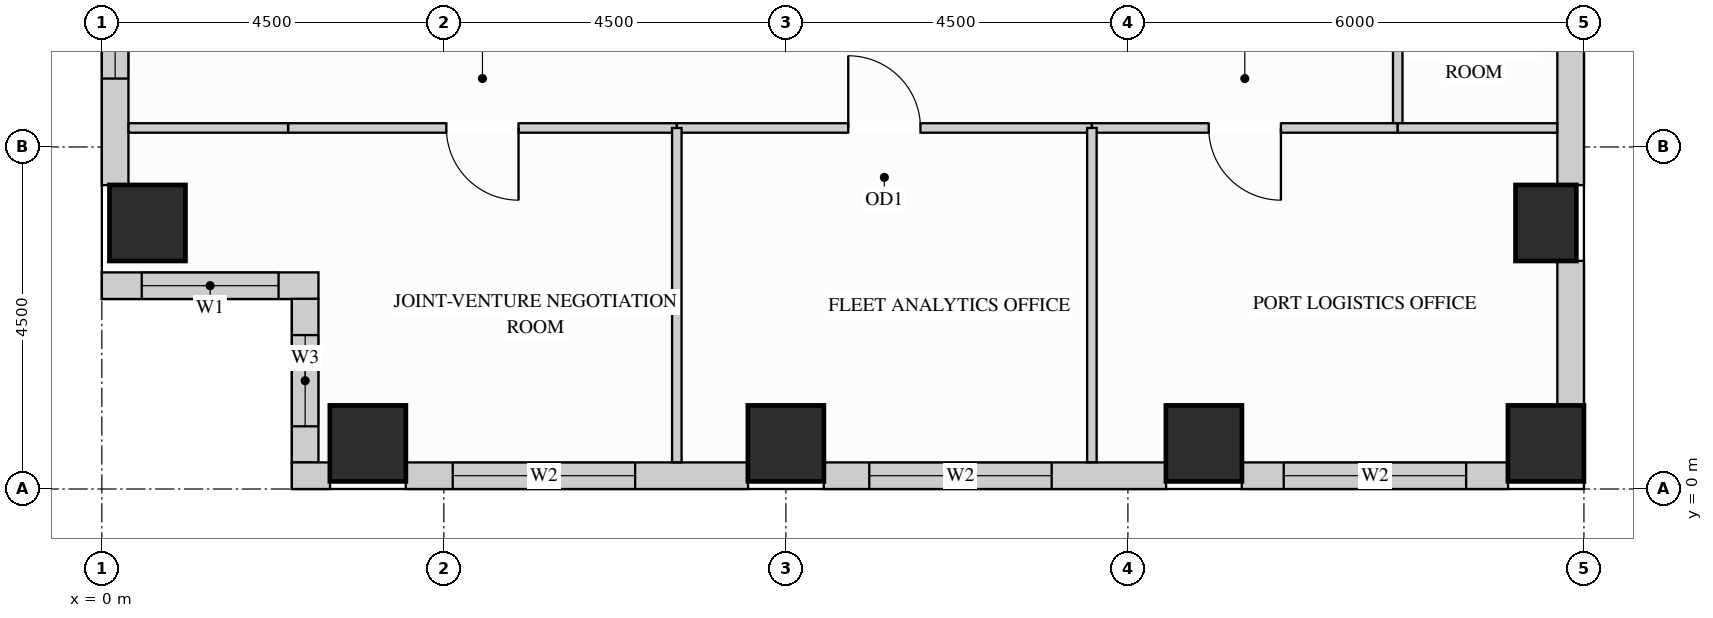
"""IFC4 building model, lengths in metres.
Left out: names, types, materials, properties, quantities, classifications, styles, units other than length and angle.
Written with IfcOpenShell. Run it as: python <this file> out.ifc"""

import sys

from ifc_helpers import new_model, si_unit, direction, frame, frame_2d, origin, origin_2d, place, context, subcontext, project, spatial, rectangle, extrude, source, transform, mapped, element, fill, save


model = new_model("IFC4")
c1 = context("Model", 3, precision=1e-05, world=origin(), true_north=direction((0.0, 1.0)))
c2 = subcontext(c1, "Body", "Model", "MODEL_VIEW")
j1 = project(units=[si_unit("LENGTHUNIT", "METRE"), si_unit("PLANEANGLEUNIT", "RADIAN")], contexts=[c1])
p1 = place(None, origin())
s1 = spatial("IfcSite", under=j1, at=p1, CompositionType="ELEMENT")
p2 = place(p1, origin())
s2 = spatial("IfcBuilding", under=s1, at=p2, CompositionType="ELEMENT")
p3 = place(p2, frame((0.0, 0.0, 164.7)))
s3 = spatial("IfcBuildingStorey", under=s2, at=p3, CompositionType="ELEMENT", Elevation=164.7)
m1 = source(origin(), c2, "Body", "SweptSolid", [
    extrude(rectangle(XDim=0.8, YDim=1.0, at=origin_2d()), origin(), (0.0, 0.0, 1.0), 3.4),
])
p4 = place(p3, frame((19.0, 3.5, 0.0), z_axis=(0.0, 0.0, 1.0), x_axis=(1.0, 0.0, 0.0)))
e1 = element("IfcColumn", 1, at=p4, inside=s3, PredefinedType="COLUMN", context=c2, shape_type="MappedRepresentation", body=[
    mapped(m1, transform((0.0, 0.0, 0.0), x_axis=(1.0, 0.0, 0.0), y_axis=(0.0, 1.0, 0.0), z_axis=(0.0, 0.0, 1.0))),
])
m2 = source(origin(), c2, "Body", "SweptSolid", [
    extrude(rectangle(XDim=1.0, YDim=1.0, at=origin_2d()), origin(), (0.0, 0.0, 1.0), 3.4),
])
for number, where, z_axis, x_axis in (
    (2, (14.5, 0.6, 0.0), (0.0, 0.0, 1.0), (1.0, 0.0, 0.0)),
    (3, (19.0, 0.6, 0.0), (0.0, 0.0, 1.0), (1.0, 0.0, 0.0)),
    (4, (3.5, 0.6, 0.0), (0.0, 0.0, 1.0), (1.0, 0.0, 0.0)),
    (5, (9.0, 0.6, 0.0), (0.0, 0.0, 1.0), (1.0, 0.0, 0.0)),
    (6, (0.6, 3.5, 0.0), (0.0, 0.0, 1.0), (1.0, 0.0, 0.0)),
):
    element("IfcColumn", number, at=place(p3, frame(where, z_axis=z_axis, x_axis=x_axis)), inside=s3, PredefinedType="COLUMN", context=c2, shape_type="MappedRepresentation", body=[
        mapped(m2, transform((0.0, 0.0, 0.0), x_axis=(1.0, 0.0, 0.0), y_axis=(0.0, 1.0, 0.0), z_axis=(0.0, 0.0, 1.0))),
    ])
p5 = place(p3, frame((0.175, 8.002, 0.0), z_axis=(0.0, 0.0, 1.0), x_axis=(0.0, -1.0, 0.0)))
e7 = element("IfcWall", 7, at=p5, inside=s3, PredefinedType="SOLIDWALL", context=c2, shape_type="SweptSolid", body=[
    extrude(rectangle(XDim=4.004, YDim=0.35, at=frame_2d((2.002, 0.0))), origin(), (0.0, 0.0, 1.0), 2.612),
])
p6 = place(p5, frame((0.802, 0.0, 0.78)))
e8 = element("IfcOpeningElement", 8, at=p6, cuts=e7, PredefinedType="OPENING", context=c2, shape_type="SweptSolid", body=[
    extrude(rectangle(XDim=1.8, YDim=1.652, at=frame_2d((0.9, 0.826))), frame((0.0, 0.185, 0.0), z_axis=(0.0, -1.0, 0.0), x_axis=(1.0, 0.0, 0.0)), (0.0, 0.0, 1.0), 0.37),
])
p7 = place(p3, frame((0.0, 2.675, 0.0), z_axis=(0.0, 0.0, 1.0), x_axis=(1.0, 0.0, 0.0)))
e9 = element("IfcWall", 9, at=p7, inside=s3, PredefinedType="SOLIDWALL", context=c2, shape_type="SweptSolid", body=[
    extrude(rectangle(XDim=2.85, YDim=0.35, at=frame_2d((1.425, 0.0))), origin(), (0.0, 0.0, 1.0), 3.385),
])
p8 = place(p7, frame((0.525, 0.0, 0.78)))
e10 = element("IfcOpeningElement", 10, at=p8, cuts=e9, PredefinedType="OPENING", context=c2, shape_type="SweptSolid", body=[
    extrude(rectangle(XDim=1.8, YDim=2.1, at=frame_2d((0.9, 1.05))), frame((0.0, 0.185, 0.0), z_axis=(0.0, -1.0, 0.0), x_axis=(1.0, 0.0, 0.0)), (0.0, 0.0, 1.0), 0.37),
])
p9 = place(p3, frame((2.675, 2.502, 0.0), z_axis=(0.0, 0.0, 1.0), x_axis=(0.0, -1.0, 0.0)))
e11 = element("IfcWall", 11, at=p9, inside=s3, PredefinedType="SOLIDWALL", context=c2, shape_type="SweptSolid", body=[
    extrude(rectangle(XDim=2.154, YDim=0.35, at=frame_2d((1.077, 0.0))), origin(), (0.0, 0.0, 1.0), 3.385),
])
p10 = place(p9, frame((0.477, 0.0, 0.78)))
e12 = element("IfcOpeningElement", 12, at=p10, cuts=e11, PredefinedType="OPENING", context=c2, shape_type="SweptSolid", body=[
    extrude(rectangle(XDim=1.2, YDim=2.1, at=frame_2d((0.6, 1.05))), frame((0.0, 0.185, 0.0), z_axis=(0.0, -1.0, 0.0), x_axis=(1.0, 0.0, 0.0)), (0.0, 0.0, 1.0), 0.37),
])
m3 = source(origin(), c2, "Body", "SweptSolid", [
    extrude(rectangle(XDim=0.502, YDim=0.35, at=frame_2d((0.251, 0.0))), origin(), (0.0, 0.0, 1.0), 3.385),
])
p11 = place(p3, frame((2.5, 0.175, 0.0), z_axis=(0.0, 0.0, 1.0), x_axis=(1.0, 0.0, 0.0)))
e13 = element("IfcWall", 13, at=p11, inside=s3, PredefinedType="SOLIDWALL", context=c2, shape_type="MappedRepresentation", body=[
    mapped(m3, transform((0.0, 0.0, 0.0), x_axis=(1.0, 0.0, 0.0), y_axis=(0.0, 1.0, 0.0), z_axis=(0.0, 0.0, 1.0))),
])
p12 = place(p3, frame((3.998, 0.175, 0.0), z_axis=(0.0, 0.0, 1.0), x_axis=(1.0, 0.0, 0.0)))
e14 = element("IfcWall", 14, at=p12, inside=s3, PredefinedType="SOLIDWALL", context=c2, shape_type="SweptSolid", body=[
    extrude(rectangle(XDim=4.504, YDim=0.35, at=frame_2d((2.252, 0.0))), origin(), (0.0, 0.0, 1.0), 2.612),
])
p13 = place(p12, frame((0.618, 0.0, 0.78)))
e15 = element("IfcOpeningElement", 15, at=p13, cuts=e14, PredefinedType="OPENING", context=c2, shape_type="SweptSolid", body=[
    extrude(rectangle(XDim=2.4, YDim=1.652, at=frame_2d((1.2, 0.826))), frame((0.0, 0.185, 0.0), z_axis=(0.0, -1.0, 0.0), x_axis=(1.0, 0.0, 0.0)), (0.0, 0.0, 1.0), 0.37),
])
p14 = place(p3, frame((9.498, 0.175, 0.0), z_axis=(0.0, 0.0, 1.0), x_axis=(1.0, 0.0, 0.0)))
e16 = element("IfcWall", 16, at=p14, inside=s3, PredefinedType="SOLIDWALL", context=c2, shape_type="SweptSolid", body=[
    extrude(rectangle(XDim=4.504, YDim=0.35, at=frame_2d((2.252, 0.0))), origin(), (0.0, 0.0, 1.0), 2.612),
])
p15 = place(p14, frame((0.599, 0.0, 0.78)))
e17 = element("IfcOpeningElement", 17, at=p15, cuts=e16, PredefinedType="OPENING", context=c2, shape_type="SweptSolid", body=[
    extrude(rectangle(XDim=2.4, YDim=1.652, at=frame_2d((1.2, 0.826))), frame((0.0, 0.185, 0.0), z_axis=(0.0, -1.0, 0.0), x_axis=(1.0, 0.0, 0.0)), (0.0, 0.0, 1.0), 0.37),
])
p16 = place(p3, frame((14.998, 0.175, 0.0), z_axis=(0.0, 0.0, 1.0), x_axis=(1.0, 0.0, 0.0)))
e18 = element("IfcWall", 18, at=p16, inside=s3, PredefinedType="SOLIDWALL", context=c2, shape_type="SweptSolid", body=[
    extrude(rectangle(XDim=3.504, YDim=0.35, at=frame_2d((1.752, 0.0))), origin(), (0.0, 0.0, 1.0), 2.612),
])
p17 = place(p16, frame((0.552, 0.0, 0.78)))
e19 = element("IfcOpeningElement", 19, at=p17, cuts=e18, PredefinedType="OPENING", context=c2, shape_type="SweptSolid", body=[
    extrude(rectangle(XDim=2.4, YDim=1.652, at=frame_2d((1.2, 0.826))), frame((0.0, 0.185, 0.0), z_axis=(0.0, -1.0, 0.0), x_axis=(1.0, 0.0, 0.0)), (0.0, 0.0, 1.0), 0.37),
])
m4 = source(origin(), c2, "Body", "SweptSolid", [
    extrude(rectangle(XDim=1.904, YDim=0.35, at=frame_2d((0.952, 0.0))), origin(), (0.0, 0.0, 1.0), 2.612),
])
p18 = place(p3, frame((19.325, 1.098, 0.0), z_axis=(0.0, 0.0, 1.0), x_axis=(0.0, 1.0, 0.0)))
e20 = element("IfcWall", 20, at=p18, inside=s3, PredefinedType="SOLIDWALL", context=c2, shape_type="MappedRepresentation", body=[
    mapped(m4, transform((0.0, 0.0, 0.0), x_axis=(1.0, 0.0, 0.0), y_axis=(0.0, 1.0, 0.0), z_axis=(0.0, 0.0, 1.0))),
])
m5 = source(origin(), c2, "Body", "SweptSolid", [
    extrude(rectangle(XDim=4.004, YDim=0.35, at=frame_2d((2.002, 0.0))), origin(), (0.0, 0.0, 1.0), 2.612),
])
p19 = place(p3, frame((19.325, 3.998, 0.0), z_axis=(0.0, 0.0, 1.0), x_axis=(0.0, 1.0, 0.0)))
e21 = element("IfcWall", 21, at=p19, inside=s3, PredefinedType="SOLIDWALL", context=c2, shape_type="MappedRepresentation", body=[
    mapped(m5, transform((0.0, 0.0, 0.0), x_axis=(1.0, 0.0, 0.0), y_axis=(0.0, 1.0, 0.0), z_axis=(0.0, 0.0, 1.0))),
])
p20 = place(p3, frame((17.05, 4.75, 0.0), z_axis=(0.0, 0.0, 1.0), x_axis=(0.0, 1.0, 0.0)))
e22 = element("IfcWall", 22, at=p20, inside=s3, PredefinedType="PARTITIONING", context=c2, shape_type="SweptSolid", body=[
    extrude(rectangle(XDim=5.85, YDim=0.125, at=frame_2d((2.925, 0.0))), origin(), (0.0, 0.0, 1.0), 3.385),
])
p21 = place(p20, frame((2.45, 0.0, 0.0)))
e23 = element("IfcOpeningElement", 23, at=p21, cuts=e22, PredefinedType="OPENING", context=c2, shape_type="SweptSolid", body=[
    extrude(rectangle(XDim=0.95, YDim=2.15, at=frame_2d((0.475, 1.075))), frame((0.0, 0.073, 0.0), z_axis=(0.0, -1.0, 0.0), x_axis=(1.0, 0.0, 0.0)), (0.0, 0.0, 1.0), 0.145),
])
p22 = place(p3, frame((2.45, 4.75, 0.0), z_axis=(0.0, 0.0, 1.0), x_axis=(1.0, 0.0, 0.0)))
e24 = element("IfcWall", 24, at=p22, inside=s3, PredefinedType="PARTITIONING", context=c2, shape_type="SweptSolid", body=[
    extrude(rectangle(XDim=5.115, YDim=0.125, at=frame_2d((2.558, 0.0))), origin(), (0.0, 0.0, 1.0), 2.848),
])
p23 = place(p22, frame((2.083, 0.0, 0.0)))
e25 = element("IfcOpeningElement", 25, at=p23, cuts=e24, PredefinedType="OPENING", context=c2, shape_type="SweptSolid", body=[
    extrude(rectangle(XDim=0.95, YDim=2.15, at=frame_2d((0.475, 1.075))), frame((0.0, 0.073, 0.0), z_axis=(0.0, -1.0, 0.0), x_axis=(1.0, 0.0, 0.0)), (0.0, 0.0, 1.0), 0.145),
])
p24 = place(p3, frame((7.565, 4.75, 0.0), z_axis=(0.0, 0.0, 1.0), x_axis=(1.0, 0.0, 0.0)))
e26 = element("IfcWall", 26, at=p24, inside=s3, PredefinedType="PARTITIONING", context=c2, shape_type="SweptSolid", body=[
    extrude(rectangle(XDim=5.461, YDim=0.125, at=frame_2d((2.73, 0.0))), origin(), (0.0, 0.0, 1.0), 2.848),
])
p25 = place(p24, frame((2.256, 0.0, 0.0)))
e27 = element("IfcOpeningElement", 27, at=p25, cuts=e26, PredefinedType="OPENING", context=c2, shape_type="SweptSolid", body=[
    extrude(rectangle(XDim=0.95, YDim=2.15, at=frame_2d((0.475, 1.075))), frame((0.0, 0.073, 0.0), z_axis=(0.0, -1.0, 0.0), x_axis=(1.0, 0.0, 0.0)), (0.0, 0.0, 1.0), 0.145),
])
p26 = place(p3, frame((13.026, 4.75, 0.0), z_axis=(0.0, 0.0, 1.0), x_axis=(1.0, 0.0, 0.0)))
e28 = element("IfcWall", 28, at=p26, inside=s3, PredefinedType="PARTITIONING", context=c2, shape_type="SweptSolid", body=[
    extrude(rectangle(XDim=4.024, YDim=0.125, at=frame_2d((2.012, 0.0))), origin(), (0.0, 0.0, 1.0), 2.848),
])
p27 = place(p26, frame((1.537, 0.0, 0.0)))
e29 = element("IfcOpeningElement", 29, at=p27, cuts=e28, PredefinedType="OPENING", context=c2, shape_type="SweptSolid", body=[
    extrude(rectangle(XDim=0.95, YDim=2.15, at=frame_2d((0.475, 1.075))), frame((0.0, 0.073, 0.0), z_axis=(0.0, -1.0, 0.0), x_axis=(1.0, 0.0, 0.0)), (0.0, 0.0, 1.0), 0.145),
])
m6 = source(origin(), c2, "Body", "SweptSolid", [
    extrude(rectangle(XDim=2.098, YDim=0.125, at=frame_2d((1.049, 0.0))), origin(), (0.0, 0.0, 1.0), 2.848),
])
for number, where, z_axis, x_axis in (
    (30, (0.352, 4.75, 0.0), (0.0, 0.0, 1.0), (1.0, 0.0, 0.0)),
    (31, (17.05, 4.75, 0.0), (0.0, 0.0, 1.0), (1.0, 0.0, 0.0)),
):
    element("IfcWall", number, at=place(p3, frame(where, z_axis=z_axis, x_axis=x_axis)), inside=s3, PredefinedType="PARTITIONING", context=c2, shape_type="MappedRepresentation", body=[
        mapped(m6, transform((0.0, 0.0, 0.0), x_axis=(1.0, 0.0, 0.0), y_axis=(0.0, 1.0, 0.0), z_axis=(0.0, 0.0, 1.0))),
    ])
m7 = source(origin(), c2, "Body", "SweptSolid", [
    extrude(rectangle(XDim=4.398, YDim=0.125, at=frame_2d((2.199, 0.0))), origin(), (0.0, 0.0, 1.0), 3.385),
])
for number, where, z_axis, x_axis in (
    (32, (7.565, 0.352, 0.0), (0.0, 0.0, 1.0), (0.0, 1.0, 0.0)),
    (33, (13.026, 0.352, 0.0), (0.0, 0.0, 1.0), (0.0, 1.0, 0.0)),
):
    element("IfcWall", number, at=place(p3, frame(where, z_axis=z_axis, x_axis=x_axis)), inside=s3, PredefinedType="PARTITIONING", context=c2, shape_type="MappedRepresentation", body=[
        mapped(m7, transform((0.0, 0.0, 0.0), x_axis=(1.0, 0.0, 0.0), y_axis=(0.0, 1.0, 0.0), z_axis=(0.0, 0.0, 1.0))),
    ])
m8 = source(origin(), c2, "Body", "SweptSolid", [
    extrude(rectangle(XDim=0.95, YDim=2.15, at=frame_2d((0.475, 1.075))), frame((0.0, 0.025, 0.0), z_axis=(0.0, -1.0, 0.0), x_axis=(1.0, 0.0, 0.0)), (0.0, 0.0, 1.0), 0.05),
])
p28 = place(p23, origin())
e34 = element("IfcDoor", 34, at=p28, inside=s3, OperationType="SINGLE_SWING_RIGHT", PredefinedType="DOOR", context=c2, shape_type="MappedRepresentation", body=[
    mapped(m8, transform((0.0, 0.0, 0.0), x_axis=(1.0, 0.0, 0.0), y_axis=(0.0, 1.0, 0.0), z_axis=(0.0, 0.0, 1.0))),
])
fill(e25, e34)
p29 = place(p25, origin())
e35 = element("IfcDoor", 35, at=p29, inside=s3, OperationType="SINGLE_SWING_LEFT", PredefinedType="DOOR", context=c2, shape_type="MappedRepresentation", body=[
    mapped(m8, transform((0.0, 0.0, 0.0), x_axis=(1.0, 0.0, 0.0), y_axis=(0.0, 1.0, 0.0), z_axis=(0.0, 0.0, 1.0))),
])
fill(e27, e35)
p30 = place(p27, origin())
e36 = element("IfcDoor", 36, at=p30, inside=s3, OperationType="SINGLE_SWING_RIGHT", PredefinedType="DOOR", context=c2, shape_type="MappedRepresentation", body=[
    mapped(m8, transform((0.0, 0.0, 0.0), x_axis=(1.0, 0.0, 0.0), y_axis=(0.0, 1.0, 0.0), z_axis=(0.0, 0.0, 1.0))),
])
fill(e29, e36)
m9 = source(origin(), c2, "Body", "SweptSolid", [
    extrude(rectangle(XDim=1.8, YDim=1.652, at=frame_2d((0.9, 0.826))), frame((0.0, 0.03, 0.0), z_axis=(0.0, -1.0, 0.0), x_axis=(1.0, 0.0, 0.0)), (0.0, 0.0, 1.0), 0.06),
])
p31 = place(p6, origin())
e37 = element("IfcWindow", 37, at=p31, inside=s3, PartitioningType="SINGLE_PANEL", PredefinedType="WINDOW", context=c2, shape_type="MappedRepresentation", body=[
    mapped(m9, transform((0.0, 0.0, 0.0), x_axis=(1.0, 0.0, 0.0), y_axis=(0.0, 1.0, 0.0), z_axis=(0.0, 0.0, 1.0))),
])
fill(e8, e37)
m10 = source(origin(), c2, "Body", "SweptSolid", [
    extrude(rectangle(XDim=1.8, YDim=2.1, at=frame_2d((0.9, 1.05))), frame((0.0, 0.03, 0.0), z_axis=(0.0, -1.0, 0.0), x_axis=(1.0, 0.0, 0.0)), (0.0, 0.0, 1.0), 0.06),
])
p32 = place(p8, origin())
e38 = element("IfcWindow", 38, at=p32, inside=s3, PartitioningType="SINGLE_PANEL", PredefinedType="WINDOW", context=c2, shape_type="MappedRepresentation", body=[
    mapped(m10, transform((0.0, 0.0, 0.0), x_axis=(1.0, 0.0, 0.0), y_axis=(0.0, 1.0, 0.0), z_axis=(0.0, 0.0, 1.0))),
])
fill(e10, e38)
m11 = source(origin(), c2, "Body", "SweptSolid", [
    extrude(rectangle(XDim=2.4, YDim=1.652, at=frame_2d((1.2, 0.826))), frame((0.0, 0.03, 0.0), z_axis=(0.0, -1.0, 0.0), x_axis=(1.0, 0.0, 0.0)), (0.0, 0.0, 1.0), 0.06),
])
p33 = place(p13, origin())
e39 = element("IfcWindow", 39, at=p33, inside=s3, PartitioningType="SINGLE_PANEL", PredefinedType="WINDOW", context=c2, shape_type="MappedRepresentation", body=[
    mapped(m11, transform((0.0, 0.0, 0.0), x_axis=(1.0, 0.0, 0.0), y_axis=(0.0, 1.0, 0.0), z_axis=(0.0, 0.0, 1.0))),
])
fill(e15, e39)
p34 = place(p15, origin())
e40 = element("IfcWindow", 40, at=p34, inside=s3, PartitioningType="SINGLE_PANEL", PredefinedType="WINDOW", context=c2, shape_type="MappedRepresentation", body=[
    mapped(m11, transform((0.0, 0.0, 0.0), x_axis=(1.0, 0.0, 0.0), y_axis=(0.0, 1.0, 0.0), z_axis=(0.0, 0.0, 1.0))),
])
fill(e17, e40)
p35 = place(p17, origin())
e41 = element("IfcWindow", 41, at=p35, inside=s3, PartitioningType="SINGLE_PANEL", PredefinedType="WINDOW", context=c2, shape_type="MappedRepresentation", body=[
    mapped(m11, transform((0.0, 0.0, 0.0), x_axis=(1.0, 0.0, 0.0), y_axis=(0.0, 1.0, 0.0), z_axis=(0.0, 0.0, 1.0))),
])
fill(e19, e41)
m12 = source(origin(), c2, "Body", "SweptSolid", [
    extrude(rectangle(XDim=1.2, YDim=2.1, at=frame_2d((0.6, 1.05))), frame((0.0, 0.03, 0.0), z_axis=(0.0, -1.0, 0.0), x_axis=(1.0, 0.0, 0.0)), (0.0, 0.0, 1.0), 0.06),
])
p36 = place(p10, origin())
e42 = element("IfcWindow", 42, at=p36, inside=s3, PartitioningType="SINGLE_PANEL", PredefinedType="WINDOW", context=c2, shape_type="MappedRepresentation", body=[
    mapped(m12, transform((0.0, 0.0, 0.0), x_axis=(1.0, 0.0, 0.0), y_axis=(0.0, 1.0, 0.0), z_axis=(0.0, 0.0, 1.0))),
])
fill(e12, e42)
save(model, sys.argv[1])
